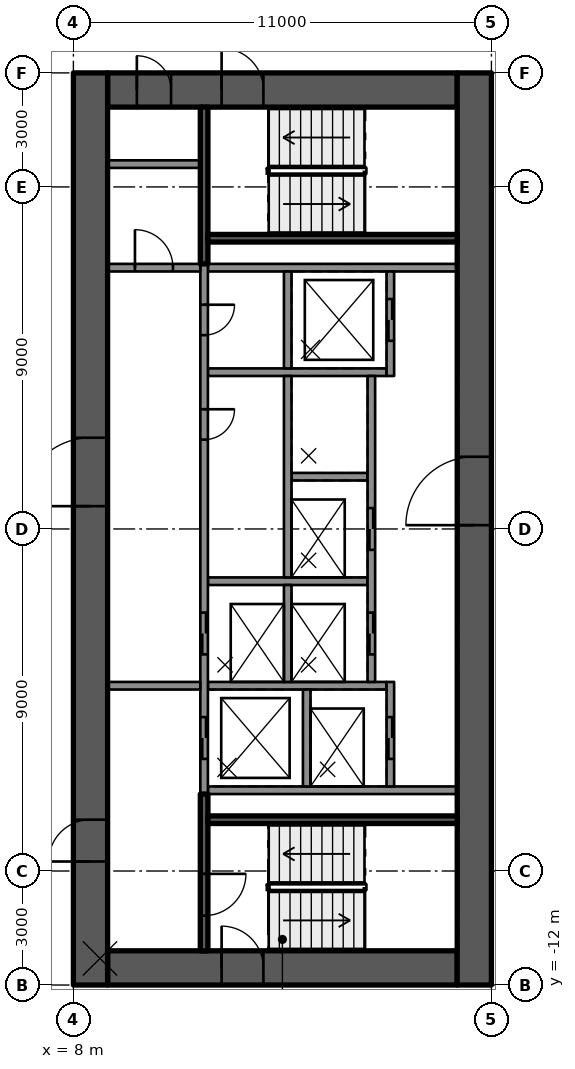
"""IFC4 building model, lengths in metres.
Left out: names, types, materials, properties, quantities, classifications, styles, units other than length and angle.
Written with IfcOpenShell. Run it as: python <this file> out.ifc"""

import sys

from ifc_helpers import new_model, si_unit, direction, frame, frame_2d, origin, place, context, subcontext, project, spatial, rectangle, extrude, element, fill, save


model = new_model("IFC4")
c1 = context("Model", 3, precision=1e-05, world=origin(), true_north=direction((0.0, 1.0)))
c2 = subcontext(c1, "Body", "Model", "MODEL_VIEW")
j1 = project(units=[si_unit("LENGTHUNIT", "METRE"), si_unit("PLANEANGLEUNIT", "RADIAN")], contexts=[c1])
p1 = place(None, origin())
s1 = spatial("IfcSite", under=j1, at=p1, CompositionType="ELEMENT")
p2 = place(p1, origin())
s2 = spatial("IfcBuilding", under=s1, at=p2, CompositionType="ELEMENT")
p3 = place(p2, frame((0.0, 0.0, 167.1)))
s3 = spatial("IfcBuildingStorey", under=s2, at=p3, CompositionType="ELEMENT", Elevation=167.1)
p4 = place(p3, frame((8.9, 11.55, 0.0), z_axis=(0.0, 0.0, 1.0), x_axis=(1.0, 0.0, 0.0)))
e1 = element("IfcWall", 1, at=p4, inside=s3, PredefinedType="SHEAR", context=c2, shape_type="SweptSolid", body=[
    extrude(rectangle(XDim=9.2, YDim=0.9, at=frame_2d((4.6, 0.0))), origin(), (0.0, 0.0, 1.0), 3.5),
])
p5 = place(p4, frame((3.0, 0.0, 0.0)))
e2 = element("IfcOpeningElement", 2, at=p5, cuts=e1, PredefinedType="OPENING", context=c2, shape_type="SweptSolid", body=[
    extrude(rectangle(XDim=1.1, YDim=2.1, at=frame_2d((0.55, 1.05))), frame((0.0, 0.46, 0.0), z_axis=(0.0, -1.0, 0.0), x_axis=(1.0, 0.0, 0.0)), (0.0, 0.0, 1.0), 0.92),
])
p6 = place(p4, frame((0.77, 0.0, 0.0)))
e3 = element("IfcOpeningElement", 3, at=p6, cuts=e1, PredefinedType="OPENING", context=c2, shape_type="SweptSolid", body=[
    extrude(rectangle(XDim=0.9, YDim=2.1, at=frame_2d((0.45, 1.05))), frame((0.0, 0.46, 0.0), z_axis=(0.0, -1.0, 0.0), x_axis=(1.0, 0.0, 0.0)), (0.0, 0.0, 1.0), 0.92),
])
p7 = place(p3, frame((8.9, -11.55, 0.0), z_axis=(0.0, 0.0, 1.0), x_axis=(1.0, 0.0, 0.0)))
e4 = element("IfcWall", 4, at=p7, inside=s3, PredefinedType="SHEAR", context=c2, shape_type="SweptSolid", body=[
    extrude(rectangle(XDim=9.2, YDim=0.9, at=frame_2d((4.6, 0.0))), origin(), (0.0, 0.0, 1.0), 3.5),
])
p8 = place(p7, frame((3.0, 0.0, 0.0)))
e5 = element("IfcOpeningElement", 5, at=p8, cuts=e4, PredefinedType="OPENING", context=c2, shape_type="SweptSolid", body=[
    extrude(rectangle(XDim=1.1, YDim=2.1, at=frame_2d((0.55, 1.05))), frame((0.0, 0.46, 0.0), z_axis=(0.0, -1.0, 0.0), x_axis=(1.0, 0.0, 0.0)), (0.0, 0.0, 1.0), 0.92),
])
p9 = place(p3, frame((8.45, -12.0, 0.0), z_axis=(0.0, 0.0, 1.0), x_axis=(0.0, 1.0, 0.0)))
e6 = element("IfcWall", 6, at=p9, inside=s3, PredefinedType="SHEAR", context=c2, shape_type="SweptSolid", body=[
    extrude(rectangle(XDim=24.0, YDim=0.9, at=frame_2d((12.0, 0.0))), origin(), (0.0, 0.0, 1.0), 3.5),
])
p10 = place(p9, frame((12.6, 0.0, 0.0)))
e7 = element("IfcOpeningElement", 7, at=p10, cuts=e6, PredefinedType="OPENING", context=c2, shape_type="SweptSolid", body=[
    extrude(rectangle(XDim=1.8, YDim=2.1, at=frame_2d((0.9, 1.05))), frame((0.0, 0.46, 0.0), z_axis=(0.0, -1.0, 0.0), x_axis=(1.0, 0.0, 0.0)), (0.0, 0.0, 1.0), 0.92),
])
p11 = place(p9, frame((3.25, 0.0, 0.0)))
e8 = element("IfcOpeningElement", 8, at=p11, cuts=e6, PredefinedType="OPENING", context=c2, shape_type="SweptSolid", body=[
    extrude(rectangle(XDim=1.1, YDim=2.1, at=frame_2d((0.55, 1.05))), frame((0.0, 0.46, 0.0), z_axis=(0.0, -1.0, 0.0), x_axis=(1.0, 0.0, 0.0)), (0.0, 0.0, 1.0), 0.92),
])
p12 = place(p3, frame((18.55, -12.0, 0.0), z_axis=(0.0, 0.0, 1.0), x_axis=(0.0, 1.0, 0.0)))
e9 = element("IfcWall", 9, at=p12, inside=s3, PredefinedType="SHEAR", context=c2, shape_type="SweptSolid", body=[
    extrude(rectangle(XDim=24.0, YDim=0.9, at=frame_2d((12.0, 0.0))), origin(), (0.0, 0.0, 1.0), 3.5),
])
p13 = place(p12, frame((12.1, 0.0, 0.0)))
e10 = element("IfcOpeningElement", 10, at=p13, cuts=e9, PredefinedType="OPENING", context=c2, shape_type="SweptSolid", body=[
    extrude(rectangle(XDim=1.8, YDim=2.1, at=frame_2d((0.9, 1.05))), frame((0.0, 0.46, 0.0), z_axis=(0.0, -1.0, 0.0), x_axis=(1.0, 0.0, 0.0)), (0.0, 0.0, 1.0), 0.92),
])
for number, where, z_axis, x_axis in (
    (11, (11.54, -6.875, 0.0), (0.0, 0.0, 1.0), (1.0, 0.0, 0.0)),
    (12, (11.54, 6.875, 0.0), (0.0, 0.0, 1.0), (1.0, 0.0, 0.0)),
):
    element("IfcWall", number, at=place(p3, frame(where, z_axis=z_axis, x_axis=x_axis)), inside=s3, PredefinedType="SOLIDWALL", context=c2, shape_type="SweptSolid", body=[
        extrude(rectangle(XDim=6.56, YDim=0.2, at=frame_2d((3.28, 0.0))), origin(), (0.0, 0.0, 1.0), 3.08),
    ])
p14 = place(p3, frame((11.54, 4.125, 0.0), z_axis=(0.0, 0.0, 1.0), x_axis=(1.0, 0.0, 0.0)))
e13 = element("IfcWall", 13, at=p14, inside=s3, PredefinedType="SOLIDWALL", context=c2, shape_type="SweptSolid", body=[
    extrude(rectangle(XDim=4.7, YDim=0.2, at=frame_2d((2.35, 0.0))), origin(), (0.0, 0.0, 1.0), 3.08),
])
p15 = place(p3, frame((13.74, 1.375, 0.0), z_axis=(0.0, 0.0, 1.0), x_axis=(1.0, 0.0, 0.0)))
e14 = element("IfcWall", 14, at=p15, inside=s3, PredefinedType="SOLIDWALL", context=c2, shape_type="SweptSolid", body=[
    extrude(rectangle(XDim=2.0, YDim=0.2, at=frame_2d((1.0, 0.0))), origin(), (0.0, 0.0, 1.0), 3.08),
])
p16 = place(p3, frame((11.54, -1.375, 0.0), z_axis=(0.0, 0.0, 1.0), x_axis=(1.0, 0.0, 0.0)))
e15 = element("IfcWall", 15, at=p16, inside=s3, PredefinedType="SOLIDWALL", context=c2, shape_type="SweptSolid", body=[
    extrude(rectangle(XDim=4.2, YDim=0.2, at=frame_2d((2.1, 0.0))), origin(), (0.0, 0.0, 1.0), 3.08),
])
p17 = place(p3, frame((11.54, -4.125, 0.0), z_axis=(0.0, 0.0, 1.0), x_axis=(1.0, 0.0, 0.0)))
e16 = element("IfcWall", 16, at=p17, inside=s3, PredefinedType="SOLIDWALL", context=c2, shape_type="SweptSolid", body=[
    extrude(rectangle(XDim=4.7, YDim=0.2, at=frame_2d((2.35, 0.0))), origin(), (0.0, 0.0, 1.0), 3.08),
])
p18 = place(p3, frame((11.44, 6.975, 0.0), z_axis=(0.0, 0.0, 1.0), x_axis=(0.0, -1.0, 0.0)))
e17 = element("IfcWall", 17, at=p18, inside=s3, PredefinedType="SOLIDWALL", context=c2, shape_type="SweptSolid", body=[
    extrude(rectangle(XDim=13.95, YDim=0.2, at=frame_2d((6.975, 0.0))), origin(), (0.0, 0.0, 1.0), 3.08),
])
p19 = place(p18, frame((9.175, 0.0, 0.0)))
e18 = element("IfcOpeningElement", 18, at=p19, cuts=e17, PredefinedType="OPENING", context=c2, shape_type="SweptSolid", body=[
    extrude(rectangle(XDim=1.1, YDim=2.1, at=frame_2d((0.55, 1.05))), frame((0.0, 0.11, 0.0), z_axis=(0.0, -1.0, 0.0), x_axis=(1.0, 0.0, 0.0)), (0.0, 0.0, 1.0), 0.22),
])
p20 = place(p18, frame((11.925, 0.0, 0.0)))
e19 = element("IfcOpeningElement", 19, at=p20, cuts=e17, PredefinedType="OPENING", context=c2, shape_type="SweptSolid", body=[
    extrude(rectangle(XDim=1.1, YDim=2.1, at=frame_2d((0.55, 1.05))), frame((0.0, 0.11, 0.0), z_axis=(0.0, -1.0, 0.0), x_axis=(1.0, 0.0, 0.0)), (0.0, 0.0, 1.0), 0.22),
])
p21 = place(p18, frame((1.075, 0.0, 0.0)))
e20 = element("IfcOpeningElement", 20, at=p21, cuts=e17, PredefinedType="OPENING", context=c2, shape_type="SweptSolid", body=[
    extrude(rectangle(XDim=0.8, YDim=2.1, at=frame_2d((0.4, 1.05))), frame((0.0, 0.11, 0.0), z_axis=(0.0, -1.0, 0.0), x_axis=(1.0, 0.0, 0.0)), (0.0, 0.0, 1.0), 0.22),
])
p22 = place(p18, frame((3.825, 0.0, 0.0)))
e21 = element("IfcOpeningElement", 21, at=p22, cuts=e17, PredefinedType="OPENING", context=c2, shape_type="SweptSolid", body=[
    extrude(rectangle(XDim=0.8, YDim=2.1, at=frame_2d((0.4, 1.05))), frame((0.0, 0.11, 0.0), z_axis=(0.0, -1.0, 0.0), x_axis=(1.0, 0.0, 0.0)), (0.0, 0.0, 1.0), 0.22),
])
p23 = place(p3, frame((13.64, 6.775, 0.0), z_axis=(0.0, 0.0, 1.0), x_axis=(0.0, -1.0, 0.0)))
e22 = element("IfcWall", 22, at=p23, inside=s3, PredefinedType="SOLIDWALL", context=c2, shape_type="SweptSolid", body=[
    extrude(rectangle(XDim=2.55, YDim=0.2, at=frame_2d((1.275, 0.0))), origin(), (0.0, 0.0, 1.0), 3.08),
])
p24 = place(p3, frame((13.64, 4.025, 0.0), z_axis=(0.0, 0.0, 1.0), x_axis=(0.0, -1.0, 0.0)))
e23 = element("IfcWall", 23, at=p24, inside=s3, PredefinedType="SOLIDWALL", context=c2, shape_type="SweptSolid", body=[
    extrude(rectangle(XDim=5.3, YDim=0.2, at=frame_2d((2.65, 0.0))), origin(), (0.0, 0.0, 1.0), 3.08),
])
for number, where, z_axis, x_axis in (
    (24, (13.64, -1.475, 0.0), (0.0, 0.0, 1.0), (0.0, -1.0, 0.0)),
    (25, (14.14, -4.225, 0.0), (0.0, 0.0, 1.0), (0.0, -1.0, 0.0)),
):
    element("IfcWall", number, at=place(p3, frame(where, z_axis=z_axis, x_axis=x_axis)), inside=s3, PredefinedType="SOLIDWALL", context=c2, shape_type="SweptSolid", body=[
        extrude(rectangle(XDim=2.55, YDim=0.2, at=frame_2d((1.275, 0.0))), origin(), (0.0, 0.0, 1.0), 3.08),
    ])
p25 = place(p3, frame((16.34, 6.775, 0.0), z_axis=(0.0, 0.0, 1.0), x_axis=(0.0, -1.0, 0.0)))
e26 = element("IfcWall", 26, at=p25, inside=s3, PredefinedType="SOLIDWALL", context=c2, shape_type="SweptSolid", body=[
    extrude(rectangle(XDim=2.75, YDim=0.2, at=frame_2d((1.375, 0.0))), origin(), (0.0, 0.0, 1.0), 3.08),
])
p26 = place(p25, frame((0.725, 0.0, 0.0)))
e27 = element("IfcOpeningElement", 27, at=p26, cuts=e26, PredefinedType="OPENING", context=c2, shape_type="SweptSolid", body=[
    extrude(rectangle(XDim=1.1, YDim=2.1, at=frame_2d((0.55, 1.05))), frame((0.0, 0.11, 0.0), z_axis=(0.0, -1.0, 0.0), x_axis=(1.0, 0.0, 0.0)), (0.0, 0.0, 1.0), 0.22),
])
p27 = place(p3, frame((15.84, 4.025, 0.0), z_axis=(0.0, 0.0, 1.0), x_axis=(0.0, -1.0, 0.0)))
e28 = element("IfcWall", 28, at=p27, inside=s3, PredefinedType="SOLIDWALL", context=c2, shape_type="SweptSolid", body=[
    extrude(rectangle(XDim=8.05, YDim=0.2, at=frame_2d((4.025, 0.0))), origin(), (0.0, 0.0, 1.0), 3.08),
])
p28 = place(p27, frame((3.475, 0.0, 0.0)))
e29 = element("IfcOpeningElement", 29, at=p28, cuts=e28, PredefinedType="OPENING", context=c2, shape_type="SweptSolid", body=[
    extrude(rectangle(XDim=1.1, YDim=2.1, at=frame_2d((0.55, 1.05))), frame((0.0, 0.11, 0.0), z_axis=(0.0, -1.0, 0.0), x_axis=(1.0, 0.0, 0.0)), (0.0, 0.0, 1.0), 0.22),
])
p29 = place(p27, frame((6.225, 0.0, 0.0)))
e30 = element("IfcOpeningElement", 30, at=p29, cuts=e28, PredefinedType="OPENING", context=c2, shape_type="SweptSolid", body=[
    extrude(rectangle(XDim=1.1, YDim=2.1, at=frame_2d((0.55, 1.05))), frame((0.0, 0.11, 0.0), z_axis=(0.0, -1.0, 0.0), x_axis=(1.0, 0.0, 0.0)), (0.0, 0.0, 1.0), 0.22),
])
p30 = place(p3, frame((16.34, -4.025, 0.0), z_axis=(0.0, 0.0, 1.0), x_axis=(0.0, -1.0, 0.0)))
e31 = element("IfcWall", 31, at=p30, inside=s3, PredefinedType="SOLIDWALL", context=c2, shape_type="SweptSolid", body=[
    extrude(rectangle(XDim=2.75, YDim=0.2, at=frame_2d((1.375, 0.0))), origin(), (0.0, 0.0, 1.0), 3.08),
])
p31 = place(p30, frame((0.925, 0.0, 0.0)))
e32 = element("IfcOpeningElement", 32, at=p31, cuts=e31, PredefinedType="OPENING", context=c2, shape_type="SweptSolid", body=[
    extrude(rectangle(XDim=1.1, YDim=2.1, at=frame_2d((0.55, 1.05))), frame((0.0, 0.11, 0.0), z_axis=(0.0, -1.0, 0.0), x_axis=(1.0, 0.0, 0.0)), (0.0, 0.0, 1.0), 0.22),
])
p32 = place(p3, frame((11.44, -6.975, 0.0), z_axis=(0.0, 0.0, 1.0), x_axis=(0.0, -1.0, 0.0)))
e33 = element("IfcWall", 33, at=p32, inside=s3, PredefinedType="SOLIDWALL", context=c2, shape_type="SweptSolid", body=[
    extrude(rectangle(XDim=4.125, YDim=0.2, at=frame_2d((2.062, 0.0))), origin(), (0.0, 0.0, 1.0), 3.08),
])
p33 = place(p32, frame((2.1, 0.0, 0.0)))
e34 = element("IfcOpeningElement", 34, at=p33, cuts=e33, PredefinedType="OPENING", context=c2, shape_type="SweptSolid", body=[
    extrude(rectangle(XDim=1.1, YDim=2.1, at=frame_2d((0.55, 1.05))), frame((0.0, 0.11, 0.0), z_axis=(0.0, -1.0, 0.0), x_axis=(1.0, 0.0, 0.0)), (0.0, 0.0, 1.0), 0.22),
])
p34 = place(p3, frame((11.54, -7.65, 0.0), z_axis=(0.0, 0.0, 1.0), x_axis=(1.0, 0.0, 0.0)))
e35 = element("IfcWall", 35, at=p34, inside=s3, PredefinedType="SOLIDWALL", context=c2, shape_type="SweptSolid", body=[
    extrude(rectangle(XDim=6.56, YDim=0.2, at=frame_2d((3.28, 0.0))), origin(), (0.0, 0.0, 1.0), 3.08),
])
p35 = place(p3, frame((11.44, 11.1, 0.0), z_axis=(0.0, 0.0, 1.0), x_axis=(0.0, -1.0, 0.0)))
e36 = element("IfcWall", 36, at=p35, inside=s3, PredefinedType="SOLIDWALL", context=c2, shape_type="SweptSolid", body=[
    extrude(rectangle(XDim=4.125, YDim=0.2, at=frame_2d((2.062, 0.0))), origin(), (0.0, 0.0, 1.0), 3.08),
])
p36 = place(p3, frame((11.54, 7.65, 0.0), z_axis=(0.0, 0.0, 1.0), x_axis=(1.0, 0.0, 0.0)))
e37 = element("IfcWall", 37, at=p36, inside=s3, PredefinedType="SOLIDWALL", context=c2, shape_type="SweptSolid", body=[
    extrude(rectangle(XDim=6.56, YDim=0.2, at=frame_2d((3.28, 0.0))), origin(), (0.0, 0.0, 1.0), 3.08),
])
p37 = place(p3, frame((8.9, -4.125, 0.0), z_axis=(0.0, 0.0, 1.0), x_axis=(1.0, 0.0, 0.0)))
e38 = element("IfcWall", 38, at=p37, inside=s3, PredefinedType="PARTITIONING", context=c2, shape_type="SweptSolid", body=[
    extrude(rectangle(XDim=2.44, YDim=0.2, at=frame_2d((1.22, 0.0))), origin(), (0.0, 0.0, 1.0), 3.08),
])
p38 = place(p3, frame((8.9, 6.875, 0.0), z_axis=(0.0, 0.0, 1.0), x_axis=(1.0, 0.0, 0.0)))
e39 = element("IfcWall", 39, at=p38, inside=s3, PredefinedType="PARTITIONING", context=c2, shape_type="SweptSolid", body=[
    extrude(rectangle(XDim=2.44, YDim=0.2, at=frame_2d((1.22, 0.0))), origin(), (0.0, 0.0, 1.0), 3.08),
])
p39 = place(p38, frame((0.72, 0.0, 0.0)))
e40 = element("IfcOpeningElement", 40, at=p39, cuts=e39, PredefinedType="OPENING", context=c2, shape_type="SweptSolid", body=[
    extrude(rectangle(XDim=1.0, YDim=2.1, at=frame_2d((0.5, 1.05))), frame((0.0, 0.11, 0.0), z_axis=(0.0, -1.0, 0.0), x_axis=(1.0, 0.0, 0.0)), (0.0, 0.0, 1.0), 0.22),
])
p40 = place(p3, frame((8.9, 9.6, 0.0), z_axis=(0.0, 0.0, 1.0), x_axis=(1.0, 0.0, 0.0)))
e41 = element("IfcWall", 41, at=p40, inside=s3, PredefinedType="PARTITIONING", context=c2, shape_type="SweptSolid", body=[
    extrude(rectangle(XDim=2.44, YDim=0.2, at=frame_2d((1.22, 0.0))), origin(), (0.0, 0.0, 1.0), 3.08),
])
p41 = place(p26, origin())
e42 = element("IfcDoor", 42, at=p41, inside=s3, OperationType="DOUBLE_DOOR_SLIDING", PredefinedType="DOOR", context=c2, shape_type="SweptSolid", body=[
    extrude(rectangle(XDim=1.1, YDim=2.1, at=frame_2d((0.55, 1.05))), frame((0.0, 0.025, 0.0), z_axis=(0.0, -1.0, 0.0), x_axis=(1.0, 0.0, 0.0)), (0.0, 0.0, 1.0), 0.05),
])
fill(e27, e42)
p42 = place(p28, origin())
e43 = element("IfcDoor", 43, at=p42, inside=s3, OperationType="DOUBLE_DOOR_SLIDING", PredefinedType="DOOR", context=c2, shape_type="SweptSolid", body=[
    extrude(rectangle(XDim=1.1, YDim=2.1, at=frame_2d((0.55, 1.05))), frame((0.0, 0.025, 0.0), z_axis=(0.0, -1.0, 0.0), x_axis=(1.0, 0.0, 0.0)), (0.0, 0.0, 1.0), 0.05),
])
fill(e29, e43)
p43 = place(p19, origin())
e44 = element("IfcDoor", 44, at=p43, inside=s3, OperationType="DOUBLE_DOOR_SLIDING", PredefinedType="DOOR", context=c2, shape_type="SweptSolid", body=[
    extrude(rectangle(XDim=1.1, YDim=2.1, at=frame_2d((0.55, 1.05))), frame((0.0, 0.025, 0.0), z_axis=(0.0, -1.0, 0.0), x_axis=(1.0, 0.0, 0.0)), (0.0, 0.0, 1.0), 0.05),
])
fill(e18, e44)
p44 = place(p29, origin())
e45 = element("IfcDoor", 45, at=p44, inside=s3, OperationType="DOUBLE_DOOR_SLIDING", PredefinedType="DOOR", context=c2, shape_type="SweptSolid", body=[
    extrude(rectangle(XDim=1.1, YDim=2.1, at=frame_2d((0.55, 1.05))), frame((0.0, 0.025, 0.0), z_axis=(0.0, -1.0, 0.0), x_axis=(1.0, 0.0, 0.0)), (0.0, 0.0, 1.0), 0.05),
])
fill(e30, e45)
p45 = place(p20, origin())
e46 = element("IfcDoor", 46, at=p45, inside=s3, OperationType="DOUBLE_DOOR_SLIDING", PredefinedType="DOOR", context=c2, shape_type="SweptSolid", body=[
    extrude(rectangle(XDim=1.1, YDim=2.1, at=frame_2d((0.55, 1.05))), frame((0.0, 0.025, 0.0), z_axis=(0.0, -1.0, 0.0), x_axis=(1.0, 0.0, 0.0)), (0.0, 0.0, 1.0), 0.05),
])
fill(e19, e46)
p46 = place(p31, origin())
e47 = element("IfcDoor", 47, at=p46, inside=s3, OperationType="DOUBLE_DOOR_SLIDING", PredefinedType="DOOR", context=c2, shape_type="SweptSolid", body=[
    extrude(rectangle(XDim=1.1, YDim=2.1, at=frame_2d((0.55, 1.05))), frame((0.0, 0.025, 0.0), z_axis=(0.0, -1.0, 0.0), x_axis=(1.0, 0.0, 0.0)), (0.0, 0.0, 1.0), 0.05),
])
fill(e32, e47)
p47 = place(p21, origin())
e48 = element("IfcDoor", 48, at=p47, inside=s3, OperationType="SINGLE_SWING_LEFT", PredefinedType="DOOR", context=c2, shape_type="SweptSolid", body=[
    extrude(rectangle(XDim=0.8, YDim=2.1, at=frame_2d((0.4, 1.05))), frame((0.0, 0.025, 0.0), z_axis=(0.0, -1.0, 0.0), x_axis=(1.0, 0.0, 0.0)), (0.0, 0.0, 1.0), 0.05),
])
fill(e20, e48)
p48 = place(p22, origin())
e49 = element("IfcDoor", 49, at=p48, inside=s3, OperationType="SINGLE_SWING_LEFT", PredefinedType="DOOR", context=c2, shape_type="SweptSolid", body=[
    extrude(rectangle(XDim=0.8, YDim=2.1, at=frame_2d((0.4, 1.05))), frame((0.0, 0.025, 0.0), z_axis=(0.0, -1.0, 0.0), x_axis=(1.0, 0.0, 0.0)), (0.0, 0.0, 1.0), 0.05),
])
fill(e21, e49)
p49 = place(p10, origin())
e50 = element("IfcDoor", 50, at=p49, inside=s3, OperationType="SINGLE_SWING_RIGHT", PredefinedType="DOOR", context=c2, shape_type="SweptSolid", body=[
    extrude(rectangle(XDim=1.8, YDim=2.1, at=frame_2d((0.9, 1.05))), frame((0.0, 0.025, 0.0), z_axis=(0.0, -1.0, 0.0), x_axis=(1.0, 0.0, 0.0)), (0.0, 0.0, 1.0), 0.05),
])
fill(e7, e50)
p50 = place(p13, origin())
e51 = element("IfcDoor", 51, at=p50, inside=s3, OperationType="SINGLE_SWING_RIGHT", PredefinedType="DOOR", context=c2, shape_type="SweptSolid", body=[
    extrude(rectangle(XDim=1.8, YDim=2.1, at=frame_2d((0.9, 1.05))), frame((0.0, 0.025, 0.0), z_axis=(0.0, -1.0, 0.0), x_axis=(1.0, 0.0, 0.0)), (0.0, 0.0, 1.0), 0.05),
])
fill(e10, e51)
p51 = place(p11, origin())
e52 = element("IfcDoor", 52, at=p51, inside=s3, OperationType="SINGLE_SWING_LEFT", PredefinedType="DOOR", context=c2, shape_type="SweptSolid", body=[
    extrude(rectangle(XDim=1.1, YDim=2.1, at=frame_2d((0.55, 1.05))), frame((0.0, 0.025, 0.0), z_axis=(0.0, -1.0, 0.0), x_axis=(1.0, 0.0, 0.0)), (0.0, 0.0, 1.0), 0.05),
])
fill(e8, e52)
p52 = place(p8, origin())
e53 = element("IfcDoor", 53, at=p52, inside=s3, OperationType="SINGLE_SWING_LEFT", PredefinedType="DOOR", context=c2, shape_type="SweptSolid", body=[
    extrude(rectangle(XDim=1.1, YDim=2.1, at=frame_2d((0.55, 1.05))), frame((0.0, 0.025, 0.0), z_axis=(0.0, -1.0, 0.0), x_axis=(1.0, 0.0, 0.0)), (0.0, 0.0, 1.0), 0.05),
])
fill(e5, e53)
p53 = place(p5, origin())
e54 = element("IfcDoor", 54, at=p53, inside=s3, OperationType="SINGLE_SWING_LEFT", PredefinedType="DOOR", context=c2, shape_type="SweptSolid", body=[
    extrude(rectangle(XDim=1.1, YDim=2.1, at=frame_2d((0.55, 1.05))), frame((0.0, 0.025, 0.0), z_axis=(0.0, -1.0, 0.0), x_axis=(1.0, 0.0, 0.0)), (0.0, 0.0, 1.0), 0.05),
])
fill(e2, e54)
p54 = place(p33, origin())
e55 = element("IfcDoor", 55, at=p54, inside=s3, OperationType="SINGLE_SWING_RIGHT", PredefinedType="DOOR", context=c2, shape_type="SweptSolid", body=[
    extrude(rectangle(XDim=1.1, YDim=2.1, at=frame_2d((0.55, 1.05))), frame((0.0, 0.025, 0.0), z_axis=(0.0, -1.0, 0.0), x_axis=(1.0, 0.0, 0.0)), (0.0, 0.0, 1.0), 0.05),
])
fill(e34, e55)
p55 = place(p6, origin())
e56 = element("IfcDoor", 56, at=p55, inside=s3, OperationType="SINGLE_SWING_LEFT", PredefinedType="DOOR", context=c2, shape_type="SweptSolid", body=[
    extrude(rectangle(XDim=0.9, YDim=2.1, at=frame_2d((0.45, 1.05))), frame((0.0, 0.025, 0.0), z_axis=(0.0, -1.0, 0.0), x_axis=(1.0, 0.0, 0.0)), (0.0, 0.0, 1.0), 0.05),
])
fill(e3, e56)
p56 = place(p39, origin())
e57 = element("IfcDoor", 57, at=p56, inside=s3, OperationType="SINGLE_SWING_RIGHT", PredefinedType="DOOR", context=c2, shape_type="SweptSolid", body=[
    extrude(rectangle(XDim=1.0, YDim=2.1, at=frame_2d((0.5, 1.05))), frame((0.0, 0.025, 0.0), z_axis=(0.0, -1.0, 0.0), x_axis=(1.0, 0.0, 0.0)), (0.0, 0.0, 1.0), 0.05),
])
fill(e40, e57)
save(model, sys.argv[1])
